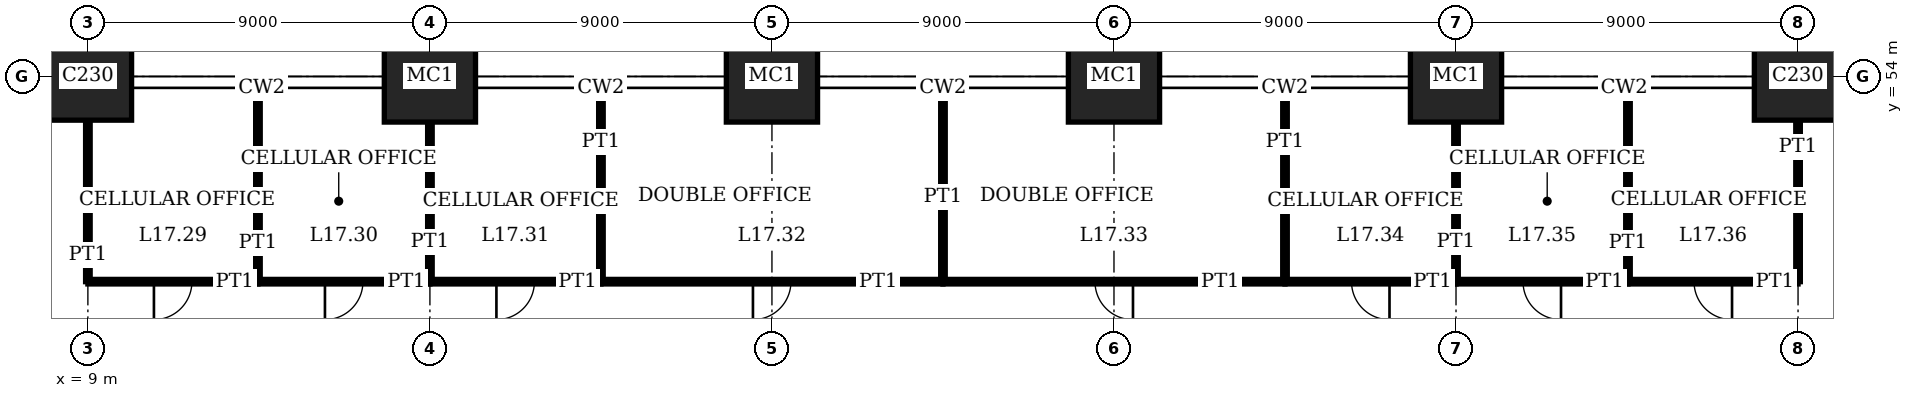
"""IFC4 building model, lengths in metres.
Left out: names, types, materials, properties, quantities, classifications, styles, units other than length and angle.
Written with IfcOpenShell. Run it as: python <this file> out.ifc"""

import sys

from ifc_helpers import new_model, si_unit, direction, frame, frame_2d, origin, origin_2d, place, context, subcontext, project, spatial, rectangle, extrude, element, fill, save


model = new_model("IFC4")
c1 = context("Model", 3, precision=1e-05, world=origin(), true_north=direction((0.0, 1.0)))
c2 = subcontext(c1, "Body", "Model", "MODEL_VIEW")
j1 = project(units=[si_unit("LENGTHUNIT", "METRE"), si_unit("PLANEANGLEUNIT", "RADIAN")], contexts=[c1])
p1 = place(None, origin())
s1 = spatial("IfcSite", under=j1, at=p1, CompositionType="ELEMENT")
p2 = place(p1, origin())
s2 = spatial("IfcBuilding", under=s1, at=p2, CompositionType="ELEMENT")
p3 = place(p2, frame((0.0, 0.0, 71.8)))
s3 = spatial("IfcBuildingStorey", under=s2, at=p3, CompositionType="ELEMENT", Elevation=71.8)
p4 = place(p3, frame((9.0, 54.0, 0.0), z_axis=(0.0, 0.0, 1.0), x_axis=(1.0, 0.0, 0.0)))
e1 = element("IfcColumn", 1, at=p4, inside=s3, PredefinedType="COLUMN", context=c2, shape_type="SweptSolid", body=[
    extrude(rectangle(XDim=2.3, YDim=2.3, at=origin_2d()), origin(), (0.0, 0.0, 1.0), 4.0),
])
for number, where, z_axis, x_axis in (
    (2, (18.0, 54.0, 0.0), (0.0, 0.0, 1.0), (1.0, 0.0, 0.0)),
    (3, (27.0, 54.0, 0.0), (0.0, 0.0, 1.0), (1.0, 0.0, 0.0)),
    (4, (36.0, 54.0, 0.0), (0.0, 0.0, 1.0), (1.0, 0.0, 0.0)),
    (5, (45.0, 54.0, 0.0), (0.0, 0.0, 1.0), (1.0, 0.0, 0.0)),
):
    element("IfcColumn", number, at=place(p3, frame(where, z_axis=z_axis, x_axis=x_axis)), inside=s3, PredefinedType="COLUMN", context=c2, shape_type="SweptSolid", body=[
        extrude(rectangle(XDim=2.4, YDim=2.4, at=origin_2d()), origin(), (0.0, 0.0, 1.0), 4.0),
    ])
p5 = place(p3, frame((54.0, 54.0, 0.0), z_axis=(0.0, 0.0, 1.0), x_axis=(1.0, 0.0, 0.0)))
e6 = element("IfcColumn", 6, at=p5, inside=s3, PredefinedType="COLUMN", context=c2, shape_type="SweptSolid", body=[
    extrude(rectangle(XDim=2.3, YDim=2.3, at=origin_2d()), origin(), (0.0, 0.0, 1.0), 4.0),
])
p6 = place(p3, frame((9.0, 48.6, 0.0), z_axis=(0.0, 0.0, 1.0), x_axis=(1.0, 0.0, 0.0)))
e7 = element("IfcWall", 7, at=p6, inside=s3, PredefinedType="PARTITIONING", context=c2, shape_type="SweptSolid", body=[
    extrude(rectangle(XDim=4.475, YDim=0.12, at=frame_2d((2.238, 0.0))), origin(), (0.0, 0.0, 1.0), 3.75),
])
p7 = place(p6, frame((1.738, 0.0, 0.0)))
e8 = element("IfcOpeningElement", 8, at=p7, cuts=e7, PredefinedType="OPENING", context=c2, shape_type="SweptSolid", body=[
    extrude(rectangle(XDim=1.0, YDim=2.4, at=frame_2d((0.5, 1.2))), frame((0.0, 0.07, 0.0), z_axis=(0.0, -1.0, 0.0), x_axis=(1.0, 0.0, 0.0)), (0.0, 0.0, 1.0), 0.14),
])
p8 = place(p3, frame((13.475, 48.6, 0.0), z_axis=(0.0, 0.0, 1.0), x_axis=(1.0, 0.0, 0.0)))
e9 = element("IfcWall", 9, at=p8, inside=s3, PredefinedType="PARTITIONING", context=c2, shape_type="SweptSolid", body=[
    extrude(rectangle(XDim=4.525, YDim=0.12, at=frame_2d((2.262, 0.0))), origin(), (0.0, 0.0, 1.0), 3.75),
])
p9 = place(p8, frame((1.763, 0.0, 0.0)))
e10 = element("IfcOpeningElement", 10, at=p9, cuts=e9, PredefinedType="OPENING", context=c2, shape_type="SweptSolid", body=[
    extrude(rectangle(XDim=1.0, YDim=2.4, at=frame_2d((0.5, 1.2))), frame((0.0, 0.07, 0.0), z_axis=(0.0, -1.0, 0.0), x_axis=(1.0, 0.0, 0.0)), (0.0, 0.0, 1.0), 0.14),
])
p10 = place(p3, frame((18.0, 48.6, 0.0), z_axis=(0.0, 0.0, 1.0), x_axis=(1.0, 0.0, 0.0)))
e11 = element("IfcWall", 11, at=p10, inside=s3, PredefinedType="PARTITIONING", context=c2, shape_type="SweptSolid", body=[
    extrude(rectangle(XDim=4.5, YDim=0.12, at=frame_2d((2.25, 0.0))), origin(), (0.0, 0.0, 1.0), 3.75),
])
p11 = place(p10, frame((1.75, 0.0, 0.0)))
e12 = element("IfcOpeningElement", 12, at=p11, cuts=e11, PredefinedType="OPENING", context=c2, shape_type="SweptSolid", body=[
    extrude(rectangle(XDim=1.0, YDim=2.4, at=frame_2d((0.5, 1.2))), frame((0.0, 0.07, 0.0), z_axis=(0.0, -1.0, 0.0), x_axis=(1.0, 0.0, 0.0)), (0.0, 0.0, 1.0), 0.14),
])
p12 = place(p3, frame((22.5, 48.6, 0.0), z_axis=(0.0, 0.0, 1.0), x_axis=(1.0, 0.0, 0.0)))
e13 = element("IfcWall", 13, at=p12, inside=s3, PredefinedType="PARTITIONING", context=c2, shape_type="SweptSolid", body=[
    extrude(rectangle(XDim=9.0, YDim=0.12, at=frame_2d((4.5, 0.0))), origin(), (0.0, 0.0, 1.0), 3.75),
])
p13 = place(p12, frame((4.0, 0.0, 0.0)))
e14 = element("IfcOpeningElement", 14, at=p13, cuts=e13, PredefinedType="OPENING", context=c2, shape_type="SweptSolid", body=[
    extrude(rectangle(XDim=1.0, YDim=2.4, at=frame_2d((0.5, 1.2))), frame((0.0, 0.07, 0.0), z_axis=(0.0, -1.0, 0.0), x_axis=(1.0, 0.0, 0.0)), (0.0, 0.0, 1.0), 0.14),
])
p14 = place(p3, frame((31.5, 48.6, 0.0), z_axis=(0.0, 0.0, 1.0), x_axis=(1.0, 0.0, 0.0)))
e15 = element("IfcWall", 15, at=p14, inside=s3, PredefinedType="PARTITIONING", context=c2, shape_type="SweptSolid", body=[
    extrude(rectangle(XDim=9.0, YDim=0.12, at=frame_2d((4.5, 0.0))), origin(), (0.0, 0.0, 1.0), 3.75),
])
p15 = place(p14, frame((4.0, 0.0, 0.0)))
e16 = element("IfcOpeningElement", 16, at=p15, cuts=e15, PredefinedType="OPENING", context=c2, shape_type="SweptSolid", body=[
    extrude(rectangle(XDim=1.0, YDim=2.4, at=frame_2d((0.5, 1.2))), frame((0.0, 0.07, 0.0), z_axis=(0.0, -1.0, 0.0), x_axis=(1.0, 0.0, 0.0)), (0.0, 0.0, 1.0), 0.14),
])
p16 = place(p3, frame((40.5, 48.6, 0.0), z_axis=(0.0, 0.0, 1.0), x_axis=(1.0, 0.0, 0.0)))
e17 = element("IfcWall", 17, at=p16, inside=s3, PredefinedType="PARTITIONING", context=c2, shape_type="SweptSolid", body=[
    extrude(rectangle(XDim=4.5, YDim=0.12, at=frame_2d((2.25, 0.0))), origin(), (0.0, 0.0, 1.0), 3.75),
])
p17 = place(p16, frame((1.75, 0.0, 0.0)))
e18 = element("IfcOpeningElement", 18, at=p17, cuts=e17, PredefinedType="OPENING", context=c2, shape_type="SweptSolid", body=[
    extrude(rectangle(XDim=1.0, YDim=2.4, at=frame_2d((0.5, 1.2))), frame((0.0, 0.07, 0.0), z_axis=(0.0, -1.0, 0.0), x_axis=(1.0, 0.0, 0.0)), (0.0, 0.0, 1.0), 0.14),
])
p18 = place(p3, frame((45.0, 48.6, 0.0), z_axis=(0.0, 0.0, 1.0), x_axis=(1.0, 0.0, 0.0)))
e19 = element("IfcWall", 19, at=p18, inside=s3, PredefinedType="PARTITIONING", context=c2, shape_type="SweptSolid", body=[
    extrude(rectangle(XDim=4.525, YDim=0.12, at=frame_2d((2.262, 0.0))), origin(), (0.0, 0.0, 1.0), 3.75),
])
p19 = place(p18, frame((1.763, 0.0, 0.0)))
e20 = element("IfcOpeningElement", 20, at=p19, cuts=e19, PredefinedType="OPENING", context=c2, shape_type="SweptSolid", body=[
    extrude(rectangle(XDim=1.0, YDim=2.4, at=frame_2d((0.5, 1.2))), frame((0.0, 0.07, 0.0), z_axis=(0.0, -1.0, 0.0), x_axis=(1.0, 0.0, 0.0)), (0.0, 0.0, 1.0), 0.14),
])
p20 = place(p3, frame((49.525, 48.6, 0.0), z_axis=(0.0, 0.0, 1.0), x_axis=(1.0, 0.0, 0.0)))
e21 = element("IfcWall", 21, at=p20, inside=s3, PredefinedType="PARTITIONING", context=c2, shape_type="SweptSolid", body=[
    extrude(rectangle(XDim=4.475, YDim=0.12, at=frame_2d((2.238, 0.0))), origin(), (0.0, 0.0, 1.0), 3.75),
])
p21 = place(p20, frame((1.738, 0.0, 0.0)))
e22 = element("IfcOpeningElement", 22, at=p21, cuts=e21, PredefinedType="OPENING", context=c2, shape_type="SweptSolid", body=[
    extrude(rectangle(XDim=1.0, YDim=2.4, at=frame_2d((0.5, 1.2))), frame((0.0, 0.07, 0.0), z_axis=(0.0, -1.0, 0.0), x_axis=(1.0, 0.0, 0.0)), (0.0, 0.0, 1.0), 0.14),
])
p22 = place(p3, frame((9.0, 48.6, 0.0), z_axis=(0.0, 0.0, 1.0), x_axis=(0.0, 1.0, 0.0)))
e23 = element("IfcWall", 23, at=p22, inside=s3, PredefinedType="PARTITIONING", context=c2, shape_type="SweptSolid", body=[
    extrude(rectangle(XDim=4.25, YDim=0.12, at=frame_2d((2.125, 0.0))), origin(), (0.0, 0.0, 1.0), 3.05),
])
p23 = place(p3, frame((13.475, 48.6, 0.0), z_axis=(0.0, 0.0, 1.0), x_axis=(0.0, 1.0, 0.0)))
e24 = element("IfcWall", 24, at=p23, inside=s3, PredefinedType="PARTITIONING", context=c2, shape_type="SweptSolid", body=[
    extrude(rectangle(XDim=5.09, YDim=0.12, at=frame_2d((2.545, 0.0))), origin(), (0.0, 0.0, 1.0), 3.75),
])
p24 = place(p3, frame((18.0, 48.6, 0.0), z_axis=(0.0, 0.0, 1.0), x_axis=(0.0, 1.0, 0.0)))
e25 = element("IfcWall", 25, at=p24, inside=s3, PredefinedType="PARTITIONING", context=c2, shape_type="SweptSolid", body=[
    extrude(rectangle(XDim=4.2, YDim=0.12, at=frame_2d((2.1, 0.0))), origin(), (0.0, 0.0, 1.0), 3.05),
])
for number, where, z_axis, x_axis in (
    (26, (22.5, 48.6, 0.0), (0.0, 0.0, 1.0), (0.0, 1.0, 0.0)),
    (27, (31.5, 48.6, 0.0), (0.0, 0.0, 1.0), (0.0, 1.0, 0.0)),
    (28, (40.5, 48.6, 0.0), (0.0, 0.0, 1.0), (0.0, 1.0, 0.0)),
):
    element("IfcWall", number, at=place(p3, frame(where, z_axis=z_axis, x_axis=x_axis)), inside=s3, PredefinedType="PARTITIONING", context=c2, shape_type="SweptSolid", body=[
        extrude(rectangle(XDim=5.09, YDim=0.12, at=frame_2d((2.545, 0.0))), origin(), (0.0, 0.0, 1.0), 3.75),
    ])
p25 = place(p3, frame((45.0, 48.6, 0.0), z_axis=(0.0, 0.0, 1.0), x_axis=(0.0, 1.0, 0.0)))
e29 = element("IfcWall", 29, at=p25, inside=s3, PredefinedType="PARTITIONING", context=c2, shape_type="SweptSolid", body=[
    extrude(rectangle(XDim=4.2, YDim=0.12, at=frame_2d((2.1, 0.0))), origin(), (0.0, 0.0, 1.0), 3.05),
])
p26 = place(p3, frame((49.525, 48.6, 0.0), z_axis=(0.0, 0.0, 1.0), x_axis=(0.0, 1.0, 0.0)))
e30 = element("IfcWall", 30, at=p26, inside=s3, PredefinedType="PARTITIONING", context=c2, shape_type="SweptSolid", body=[
    extrude(rectangle(XDim=5.09, YDim=0.12, at=frame_2d((2.545, 0.0))), origin(), (0.0, 0.0, 1.0), 3.75),
])
p27 = place(p3, frame((54.0, 48.6, 0.0), z_axis=(0.0, 0.0, 1.0), x_axis=(0.0, 1.0, 0.0)))
e31 = element("IfcWall", 31, at=p27, inside=s3, PredefinedType="PARTITIONING", context=c2, shape_type="SweptSolid", body=[
    extrude(rectangle(XDim=4.25, YDim=0.12, at=frame_2d((2.125, 0.0))), origin(), (0.0, 0.0, 1.0), 3.05),
])
p28 = place(p7, origin())
e32 = element("IfcDoor", 32, at=p28, inside=s3, OperationType="SINGLE_SWING_LEFT", PredefinedType="DOOR", context=c2, shape_type="SweptSolid", body=[
    extrude(rectangle(XDim=1.0, YDim=2.4, at=frame_2d((0.5, 1.2))), frame((0.0, 0.025, 0.0), z_axis=(0.0, -1.0, 0.0), x_axis=(1.0, 0.0, 0.0)), (0.0, 0.0, 1.0), 0.05),
])
fill(e8, e32)
p29 = place(p9, origin())
e33 = element("IfcDoor", 33, at=p29, inside=s3, OperationType="SINGLE_SWING_LEFT", PredefinedType="DOOR", context=c2, shape_type="SweptSolid", body=[
    extrude(rectangle(XDim=1.0, YDim=2.4, at=frame_2d((0.5, 1.2))), frame((0.0, 0.025, 0.0), z_axis=(0.0, -1.0, 0.0), x_axis=(1.0, 0.0, 0.0)), (0.0, 0.0, 1.0), 0.05),
])
fill(e10, e33)
p30 = place(p11, origin())
e34 = element("IfcDoor", 34, at=p30, inside=s3, OperationType="SINGLE_SWING_LEFT", PredefinedType="DOOR", context=c2, shape_type="SweptSolid", body=[
    extrude(rectangle(XDim=1.0, YDim=2.4, at=frame_2d((0.5, 1.2))), frame((0.0, 0.025, 0.0), z_axis=(0.0, -1.0, 0.0), x_axis=(1.0, 0.0, 0.0)), (0.0, 0.0, 1.0), 0.05),
])
fill(e12, e34)
p31 = place(p13, origin())
e35 = element("IfcDoor", 35, at=p31, inside=s3, OperationType="SINGLE_SWING_LEFT", PredefinedType="DOOR", context=c2, shape_type="SweptSolid", body=[
    extrude(rectangle(XDim=1.0, YDim=2.4, at=frame_2d((0.5, 1.2))), frame((0.0, 0.025, 0.0), z_axis=(0.0, -1.0, 0.0), x_axis=(1.0, 0.0, 0.0)), (0.0, 0.0, 1.0), 0.05),
])
fill(e14, e35)
p32 = place(p15, origin())
e36 = element("IfcDoor", 36, at=p32, inside=s3, OperationType="SINGLE_SWING_RIGHT", PredefinedType="DOOR", context=c2, shape_type="SweptSolid", body=[
    extrude(rectangle(XDim=1.0, YDim=2.4, at=frame_2d((0.5, 1.2))), frame((0.0, 0.025, 0.0), z_axis=(0.0, -1.0, 0.0), x_axis=(1.0, 0.0, 0.0)), (0.0, 0.0, 1.0), 0.05),
])
fill(e16, e36)
p33 = place(p17, origin())
e37 = element("IfcDoor", 37, at=p33, inside=s3, OperationType="SINGLE_SWING_RIGHT", PredefinedType="DOOR", context=c2, shape_type="SweptSolid", body=[
    extrude(rectangle(XDim=1.0, YDim=2.4, at=frame_2d((0.5, 1.2))), frame((0.0, 0.025, 0.0), z_axis=(0.0, -1.0, 0.0), x_axis=(1.0, 0.0, 0.0)), (0.0, 0.0, 1.0), 0.05),
])
fill(e18, e37)
p34 = place(p19, origin())
e38 = element("IfcDoor", 38, at=p34, inside=s3, OperationType="SINGLE_SWING_RIGHT", PredefinedType="DOOR", context=c2, shape_type="SweptSolid", body=[
    extrude(rectangle(XDim=1.0, YDim=2.4, at=frame_2d((0.5, 1.2))), frame((0.0, 0.025, 0.0), z_axis=(0.0, -1.0, 0.0), x_axis=(1.0, 0.0, 0.0)), (0.0, 0.0, 1.0), 0.05),
])
fill(e20, e38)
p35 = place(p21, origin())
e39 = element("IfcDoor", 39, at=p35, inside=s3, OperationType="SINGLE_SWING_RIGHT", PredefinedType="DOOR", context=c2, shape_type="SweptSolid", body=[
    extrude(rectangle(XDim=1.0, YDim=2.4, at=frame_2d((0.5, 1.2))), frame((0.0, 0.025, 0.0), z_axis=(0.0, -1.0, 0.0), x_axis=(1.0, 0.0, 0.0)), (0.0, 0.0, 1.0), 0.05),
])
fill(e22, e39)
save(model, sys.argv[1])
